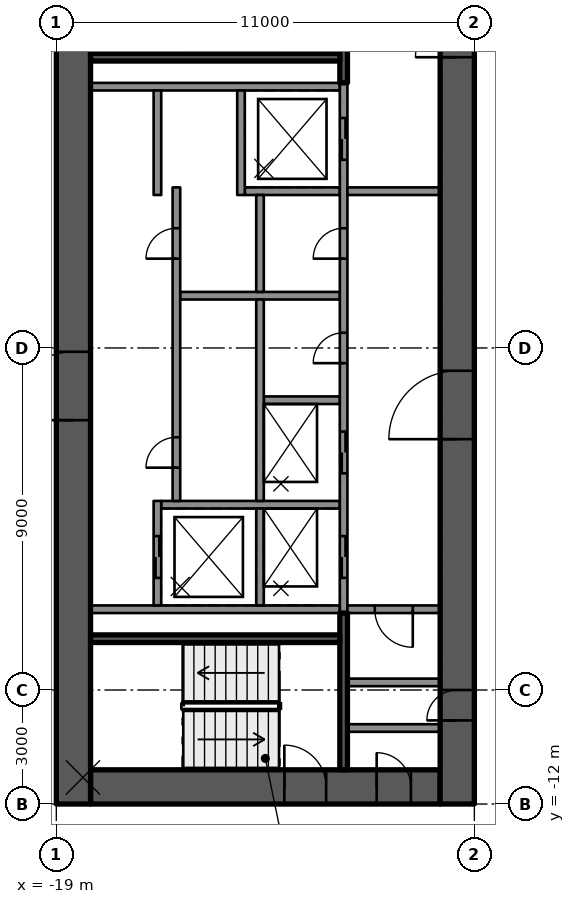
"""IFC4 building model, lengths in metres.
Left out: names, types, materials, properties, quantities, classifications, styles, units other than length and angle.
Written with IfcOpenShell. Run it as: python <this file> out.ifc"""

import sys

from ifc_helpers import new_model, si_unit, direction, frame, frame_2d, origin, place, context, subcontext, project, spatial, rectangle, extrude, element, fill, save


model = new_model("IFC4")
c1 = context("Model", 3, precision=1e-05, world=origin(), true_north=direction((0.0, 1.0)))
c2 = subcontext(c1, "Body", "Model", "MODEL_VIEW")
j1 = project(units=[si_unit("LENGTHUNIT", "METRE"), si_unit("PLANEANGLEUNIT", "RADIAN")], contexts=[c1])
p1 = place(None, origin())
s1 = spatial("IfcSite", under=j1, at=p1, CompositionType="ELEMENT")
p2 = place(p1, origin())
s2 = spatial("IfcBuilding", under=s1, at=p2, CompositionType="ELEMENT")
p3 = place(p2, frame((0.0, 0.0, 275.4)))
s3 = spatial("IfcBuildingStorey", under=s2, at=p3, CompositionType="ELEMENT", Elevation=275.4)
p4 = place(p3, frame((-18.1, -11.55, 0.0), z_axis=(0.0, 0.0, 1.0), x_axis=(1.0, 0.0, 0.0)))
e1 = element("IfcWall", 1, at=p4, inside=s3, PredefinedType="SHEAR", context=c2, shape_type="SweptSolid", body=[
    extrude(rectangle(XDim=9.2, YDim=0.9, at=frame_2d((4.6, 0.0))), origin(), (0.0, 0.0, 1.0), 3.5),
])
p5 = place(p4, frame((5.1, 0.0, 0.0)))
e2 = element("IfcOpeningElement", 2, at=p5, cuts=e1, PredefinedType="OPENING", context=c2, shape_type="SweptSolid", body=[
    extrude(rectangle(XDim=1.1, YDim=2.1, at=frame_2d((0.55, 1.05))), frame((0.0, 0.46, 0.0), z_axis=(0.0, -1.0, 0.0), x_axis=(1.0, 0.0, 0.0)), (0.0, 0.0, 1.0), 0.92),
])
p6 = place(p4, frame((7.53, 0.0, 0.0)))
e3 = element("IfcOpeningElement", 3, at=p6, cuts=e1, PredefinedType="OPENING", context=c2, shape_type="SweptSolid", body=[
    extrude(rectangle(XDim=0.9, YDim=2.1, at=frame_2d((0.45, 1.05))), frame((0.0, 0.46, 0.0), z_axis=(0.0, -1.0, 0.0), x_axis=(1.0, 0.0, 0.0)), (0.0, 0.0, 1.0), 0.92),
])
p7 = place(p3, frame((-18.55, -12.0, 0.0), z_axis=(0.0, 0.0, 1.0), x_axis=(0.0, 1.0, 0.0)))
e4 = element("IfcWall", 4, at=p7, inside=s3, PredefinedType="SHEAR", context=c2, shape_type="SweptSolid", body=[
    extrude(rectangle(XDim=24.0, YDim=0.9, at=frame_2d((12.0, 0.0))), origin(), (0.0, 0.0, 1.0), 3.5),
])
p8 = place(p7, frame((10.1, 0.0, 0.0)))
e5 = element("IfcOpeningElement", 5, at=p8, cuts=e4, PredefinedType="OPENING", context=c2, shape_type="SweptSolid", body=[
    extrude(rectangle(XDim=1.8, YDim=2.1, at=frame_2d((0.9, 1.05))), frame((0.0, 0.46, 0.0), z_axis=(0.0, -1.0, 0.0), x_axis=(1.0, 0.0, 0.0)), (0.0, 0.0, 1.0), 0.92),
])
p9 = place(p3, frame((-8.45, -12.0, 0.0), z_axis=(0.0, 0.0, 1.0), x_axis=(0.0, 1.0, 0.0)))
e6 = element("IfcWall", 6, at=p9, inside=s3, PredefinedType="SHEAR", context=c2, shape_type="SweptSolid", body=[
    extrude(rectangle(XDim=24.0, YDim=0.9, at=frame_2d((12.0, 0.0))), origin(), (0.0, 0.0, 1.0), 3.5),
])
p10 = place(p9, frame((9.6, 0.0, 0.0)))
e7 = element("IfcOpeningElement", 7, at=p10, cuts=e6, PredefinedType="OPENING", context=c2, shape_type="SweptSolid", body=[
    extrude(rectangle(XDim=1.8, YDim=2.1, at=frame_2d((0.9, 1.05))), frame((0.0, 0.46, 0.0), z_axis=(0.0, -1.0, 0.0), x_axis=(1.0, 0.0, 0.0)), (0.0, 0.0, 1.0), 0.92),
])
p11 = place(p9, frame((19.65, 0.0, 0.0)))
e8 = element("IfcOpeningElement", 8, at=p11, cuts=e6, PredefinedType="OPENING", context=c2, shape_type="SweptSolid", body=[
    extrude(rectangle(XDim=1.1, YDim=2.1, at=frame_2d((0.55, 1.05))), frame((0.0, 0.46, 0.0), z_axis=(0.0, -1.0, 0.0), x_axis=(1.0, 0.0, 0.0)), (0.0, 0.0, 1.0), 0.92),
])
p12 = place(p9, frame((2.2, 0.0, 0.0)))
e9 = element("IfcOpeningElement", 9, at=p12, cuts=e6, PredefinedType="OPENING", context=c2, shape_type="SweptSolid", body=[
    extrude(rectangle(XDim=0.8, YDim=2.1, at=frame_2d((0.4, 1.05))), frame((0.0, 0.46, 0.0), z_axis=(0.0, -1.0, 0.0), x_axis=(1.0, 0.0, 0.0)), (0.0, 0.0, 1.0), 0.92),
])
for number, where, z_axis, x_axis in (
    (10, (-11.54, 6.875, 0.0), (0.0, 0.0, 1.0), (-1.0, 0.0, 0.0)),
    (11, (-11.54, -6.875, 0.0), (0.0, 0.0, 1.0), (-1.0, 0.0, 0.0)),
):
    element("IfcWall", number, at=place(p3, frame(where, z_axis=z_axis, x_axis=x_axis)), inside=s3, PredefinedType="SOLIDWALL", context=c2, shape_type="SweptSolid", body=[
        extrude(rectangle(XDim=6.56, YDim=0.2, at=frame_2d((3.28, 0.0))), origin(), (0.0, 0.0, 1.0), 3.09),
    ])
p13 = place(p3, frame((-11.54, -4.125, 0.0), z_axis=(0.0, 0.0, 1.0), x_axis=(-1.0, 0.0, 0.0)))
e12 = element("IfcWall", 12, at=p13, inside=s3, PredefinedType="SOLIDWALL", context=c2, shape_type="SweptSolid", body=[
    extrude(rectangle(XDim=4.7, YDim=0.2, at=frame_2d((2.35, 0.0))), origin(), (0.0, 0.0, 1.0), 3.09),
])
p14 = place(p3, frame((-11.54, -1.375, 0.0), z_axis=(0.0, 0.0, 1.0), x_axis=(-1.0, 0.0, 0.0)))
e13 = element("IfcWall", 13, at=p14, inside=s3, PredefinedType="SOLIDWALL", context=c2, shape_type="SweptSolid", body=[
    extrude(rectangle(XDim=2.0, YDim=0.2, at=frame_2d((1.0, 0.0))), origin(), (0.0, 0.0, 1.0), 3.09),
])
p15 = place(p3, frame((-11.54, 1.375, 0.0), z_axis=(0.0, 0.0, 1.0), x_axis=(-1.0, 0.0, 0.0)))
e14 = element("IfcWall", 14, at=p15, inside=s3, PredefinedType="SOLIDWALL", context=c2, shape_type="SweptSolid", body=[
    extrude(rectangle(XDim=4.2, YDim=0.2, at=frame_2d((2.1, 0.0))), origin(), (0.0, 0.0, 1.0), 3.09),
])
p16 = place(p3, frame((-11.54, 4.125, 0.0), z_axis=(0.0, 0.0, 1.0), x_axis=(-1.0, 0.0, 0.0)))
e15 = element("IfcWall", 15, at=p16, inside=s3, PredefinedType="SOLIDWALL", context=c2, shape_type="SweptSolid", body=[
    extrude(rectangle(XDim=2.5, YDim=0.2, at=frame_2d((1.25, 0.0))), origin(), (0.0, 0.0, 1.0), 3.09),
])
p17 = place(p3, frame((-11.44, -6.975, 0.0), z_axis=(0.0, 0.0, 1.0), x_axis=(0.0, 1.0, 0.0)))
e16 = element("IfcWall", 16, at=p17, inside=s3, PredefinedType="SOLIDWALL", context=c2, shape_type="SweptSolid", body=[
    extrude(rectangle(XDim=13.95, YDim=0.2, at=frame_2d((6.975, 0.0))), origin(), (0.0, 0.0, 1.0), 3.09),
])
p18 = place(p17, frame((0.925, 0.0, 0.0)))
e17 = element("IfcOpeningElement", 17, at=p18, cuts=e16, PredefinedType="OPENING", context=c2, shape_type="SweptSolid", body=[
    extrude(rectangle(XDim=1.1, YDim=2.1, at=frame_2d((0.55, 1.05))), frame((0.0, 0.11, 0.0), z_axis=(0.0, -1.0, 0.0), x_axis=(1.0, 0.0, 0.0)), (0.0, 0.0, 1.0), 0.22),
])
p19 = place(p17, frame((3.675, 0.0, 0.0)))
e18 = element("IfcOpeningElement", 18, at=p19, cuts=e16, PredefinedType="OPENING", context=c2, shape_type="SweptSolid", body=[
    extrude(rectangle(XDim=1.1, YDim=2.1, at=frame_2d((0.55, 1.05))), frame((0.0, 0.11, 0.0), z_axis=(0.0, -1.0, 0.0), x_axis=(1.0, 0.0, 0.0)), (0.0, 0.0, 1.0), 0.22),
])
p20 = place(p17, frame((11.925, 0.0, 0.0)))
e19 = element("IfcOpeningElement", 19, at=p20, cuts=e16, PredefinedType="OPENING", context=c2, shape_type="SweptSolid", body=[
    extrude(rectangle(XDim=1.1, YDim=2.1, at=frame_2d((0.55, 1.05))), frame((0.0, 0.11, 0.0), z_axis=(0.0, -1.0, 0.0), x_axis=(1.0, 0.0, 0.0)), (0.0, 0.0, 1.0), 0.22),
])
p21 = place(p17, frame((6.575, 0.0, 0.0)))
e20 = element("IfcOpeningElement", 20, at=p21, cuts=e16, PredefinedType="OPENING", context=c2, shape_type="SweptSolid", body=[
    extrude(rectangle(XDim=0.8, YDim=2.1, at=frame_2d((0.4, 1.05))), frame((0.0, 0.11, 0.0), z_axis=(0.0, -1.0, 0.0), x_axis=(1.0, 0.0, 0.0)), (0.0, 0.0, 1.0), 0.22),
])
p22 = place(p17, frame((9.325, 0.0, 0.0)))
e21 = element("IfcOpeningElement", 21, at=p22, cuts=e16, PredefinedType="OPENING", context=c2, shape_type="SweptSolid", body=[
    extrude(rectangle(XDim=0.8, YDim=2.1, at=frame_2d((0.4, 1.05))), frame((0.0, 0.11, 0.0), z_axis=(0.0, -1.0, 0.0), x_axis=(1.0, 0.0, 0.0)), (0.0, 0.0, 1.0), 0.22),
])
p23 = place(p3, frame((-13.64, -6.775, 0.0), z_axis=(0.0, 0.0, 1.0), x_axis=(0.0, 1.0, 0.0)))
e22 = element("IfcWall", 22, at=p23, inside=s3, PredefinedType="SOLIDWALL", context=c2, shape_type="SweptSolid", body=[
    extrude(rectangle(XDim=2.55, YDim=0.2, at=frame_2d((1.275, 0.0))), origin(), (0.0, 0.0, 1.0), 3.09),
])
p24 = place(p3, frame((-13.64, -4.025, 0.0), z_axis=(0.0, 0.0, 1.0), x_axis=(0.0, 1.0, 0.0)))
e23 = element("IfcWall", 23, at=p24, inside=s3, PredefinedType="SOLIDWALL", context=c2, shape_type="SweptSolid", body=[
    extrude(rectangle(XDim=5.3, YDim=0.2, at=frame_2d((2.65, 0.0))), origin(), (0.0, 0.0, 1.0), 3.09),
])
p25 = place(p3, frame((-13.64, 1.475, 0.0), z_axis=(0.0, 0.0, 1.0), x_axis=(0.0, 1.0, 0.0)))
e24 = element("IfcWall", 24, at=p25, inside=s3, PredefinedType="SOLIDWALL", context=c2, shape_type="SweptSolid", body=[
    extrude(rectangle(XDim=2.55, YDim=0.2, at=frame_2d((1.275, 0.0))), origin(), (0.0, 0.0, 1.0), 3.09),
])
p26 = place(p3, frame((-14.14, 4.025, 0.0), z_axis=(0.0, 0.0, 1.0), x_axis=(0.0, 1.0, 0.0)))
e25 = element("IfcWall", 25, at=p26, inside=s3, PredefinedType="SOLIDWALL", context=c2, shape_type="SweptSolid", body=[
    extrude(rectangle(XDim=2.75, YDim=0.2, at=frame_2d((1.375, 0.0))), origin(), (0.0, 0.0, 1.0), 3.09),
])
p27 = place(p3, frame((-16.34, -6.775, 0.0), z_axis=(0.0, 0.0, 1.0), x_axis=(0.0, 1.0, 0.0)))
e26 = element("IfcWall", 26, at=p27, inside=s3, PredefinedType="SOLIDWALL", context=c2, shape_type="SweptSolid", body=[
    extrude(rectangle(XDim=2.75, YDim=0.2, at=frame_2d((1.375, 0.0))), origin(), (0.0, 0.0, 1.0), 3.09),
])
p28 = place(p27, frame((0.725, 0.0, 0.0)))
e27 = element("IfcOpeningElement", 27, at=p28, cuts=e26, PredefinedType="OPENING", context=c2, shape_type="SweptSolid", body=[
    extrude(rectangle(XDim=1.1, YDim=2.1, at=frame_2d((0.55, 1.05))), frame((0.0, 0.11, 0.0), z_axis=(0.0, -1.0, 0.0), x_axis=(1.0, 0.0, 0.0)), (0.0, 0.0, 1.0), 0.22),
])
p29 = place(p3, frame((-15.84, -4.025, 0.0), z_axis=(0.0, 0.0, 1.0), x_axis=(0.0, 1.0, 0.0)))
e28 = element("IfcWall", 28, at=p29, inside=s3, PredefinedType="SOLIDWALL", context=c2, shape_type="SweptSolid", body=[
    extrude(rectangle(XDim=8.25, YDim=0.2, at=frame_2d((4.125, 0.0))), origin(), (0.0, 0.0, 1.0), 3.09),
])
p30 = place(p29, frame((0.875, 0.0, 0.0)))
e29 = element("IfcOpeningElement", 29, at=p30, cuts=e28, PredefinedType="OPENING", context=c2, shape_type="SweptSolid", body=[
    extrude(rectangle(XDim=0.8, YDim=2.1, at=frame_2d((0.4, 1.05))), frame((0.0, 0.11, 0.0), z_axis=(0.0, -1.0, 0.0), x_axis=(1.0, 0.0, 0.0)), (0.0, 0.0, 1.0), 0.22),
])
p31 = place(p29, frame((6.375, 0.0, 0.0)))
e30 = element("IfcOpeningElement", 30, at=p31, cuts=e28, PredefinedType="OPENING", context=c2, shape_type="SweptSolid", body=[
    extrude(rectangle(XDim=0.8, YDim=2.1, at=frame_2d((0.4, 1.05))), frame((0.0, 0.11, 0.0), z_axis=(0.0, -1.0, 0.0), x_axis=(1.0, 0.0, 0.0)), (0.0, 0.0, 1.0), 0.22),
])
p32 = place(p3, frame((-16.34, 4.025, 0.0), z_axis=(0.0, 0.0, 1.0), x_axis=(0.0, 1.0, 0.0)))
e31 = element("IfcWall", 31, at=p32, inside=s3, PredefinedType="SOLIDWALL", context=c2, shape_type="SweptSolid", body=[
    extrude(rectangle(XDim=2.75, YDim=0.2, at=frame_2d((1.375, 0.0))), origin(), (0.0, 0.0, 1.0), 3.09),
])
p33 = place(p3, frame((-11.44, 6.975, 0.0), z_axis=(0.0, 0.0, 1.0), x_axis=(0.0, 1.0, 0.0)))
e32 = element("IfcWall", 32, at=p33, inside=s3, PredefinedType="SOLIDWALL", context=c2, shape_type="SweptSolid", body=[
    extrude(rectangle(XDim=4.125, YDim=0.2, at=frame_2d((2.062, 0.0))), origin(), (0.0, 0.0, 1.0), 3.09),
])
p34 = place(p33, frame((2.1, 0.0, 0.0)))
e33 = element("IfcOpeningElement", 33, at=p34, cuts=e32, PredefinedType="OPENING", context=c2, shape_type="SweptSolid", body=[
    extrude(rectangle(XDim=1.1, YDim=2.1, at=frame_2d((0.55, 1.05))), frame((0.0, 0.11, 0.0), z_axis=(0.0, -1.0, 0.0), x_axis=(1.0, 0.0, 0.0)), (0.0, 0.0, 1.0), 0.22),
])
p35 = place(p3, frame((-11.54, 7.65, 0.0), z_axis=(0.0, 0.0, 1.0), x_axis=(-1.0, 0.0, 0.0)))
e34 = element("IfcWall", 34, at=p35, inside=s3, PredefinedType="SOLIDWALL", context=c2, shape_type="SweptSolid", body=[
    extrude(rectangle(XDim=6.56, YDim=0.2, at=frame_2d((3.28, 0.0))), origin(), (0.0, 0.0, 1.0), 3.09),
])
p36 = place(p3, frame((-11.44, -11.1, 0.0), z_axis=(0.0, 0.0, 1.0), x_axis=(0.0, 1.0, 0.0)))
e35 = element("IfcWall", 35, at=p36, inside=s3, PredefinedType="SOLIDWALL", context=c2, shape_type="SweptSolid", body=[
    extrude(rectangle(XDim=4.125, YDim=0.2, at=frame_2d((2.062, 0.0))), origin(), (0.0, 0.0, 1.0), 3.09),
])
p37 = place(p3, frame((-11.54, -7.65, 0.0), z_axis=(0.0, 0.0, 1.0), x_axis=(-1.0, 0.0, 0.0)))
e36 = element("IfcWall", 36, at=p37, inside=s3, PredefinedType="SOLIDWALL", context=c2, shape_type="SweptSolid", body=[
    extrude(rectangle(XDim=6.56, YDim=0.2, at=frame_2d((3.28, 0.0))), origin(), (0.0, 0.0, 1.0), 3.09),
])
p38 = place(p3, frame((-8.9, 4.125, 0.0), z_axis=(0.0, 0.0, 1.0), x_axis=(-1.0, 0.0, 0.0)))
e37 = element("IfcWall", 37, at=p38, inside=s3, PredefinedType="PARTITIONING", context=c2, shape_type="SweptSolid", body=[
    extrude(rectangle(XDim=2.44, YDim=0.2, at=frame_2d((1.22, 0.0))), origin(), (0.0, 0.0, 1.0), 3.09),
])
p39 = place(p3, frame((-8.9, -6.875, 0.0), z_axis=(0.0, 0.0, 1.0), x_axis=(-1.0, 0.0, 0.0)))
e38 = element("IfcWall", 38, at=p39, inside=s3, PredefinedType="PARTITIONING", context=c2, shape_type="SweptSolid", body=[
    extrude(rectangle(XDim=2.44, YDim=0.2, at=frame_2d((1.22, 0.0))), origin(), (0.0, 0.0, 1.0), 3.09),
])
p40 = place(p39, frame((0.72, 0.0, 0.0)))
e39 = element("IfcOpeningElement", 39, at=p40, cuts=e38, PredefinedType="OPENING", context=c2, shape_type="SweptSolid", body=[
    extrude(rectangle(XDim=1.0, YDim=2.1, at=frame_2d((0.5, 1.05))), frame((0.0, 0.11, 0.0), z_axis=(0.0, -1.0, 0.0), x_axis=(1.0, 0.0, 0.0)), (0.0, 0.0, 1.0), 0.22),
])
for number, where, z_axis, x_axis in (
    (40, (-8.9, -10.0, 0.0), (0.0, 0.0, 1.0), (-1.0, 0.0, 0.0)),
    (41, (-8.9, -8.8, 0.0), (0.0, 0.0, 1.0), (-1.0, 0.0, 0.0)),
):
    element("IfcWall", number, at=place(p3, frame(where, z_axis=z_axis, x_axis=x_axis)), inside=s3, PredefinedType="PARTITIONING", context=c2, shape_type="SweptSolid", body=[
        extrude(rectangle(XDim=2.44, YDim=0.2, at=frame_2d((1.22, 0.0))), origin(), (0.0, 0.0, 1.0), 3.09),
    ])
p41 = place(p18, origin())
e42 = element("IfcDoor", 42, at=p41, inside=s3, OperationType="DOUBLE_DOOR_SLIDING", PredefinedType="DOOR", context=c2, shape_type="SweptSolid", body=[
    extrude(rectangle(XDim=1.1, YDim=2.1, at=frame_2d((0.55, 1.05))), frame((0.0, 0.025, 0.0), z_axis=(0.0, -1.0, 0.0), x_axis=(1.0, 0.0, 0.0)), (0.0, 0.0, 1.0), 0.05),
])
fill(e17, e42)
p42 = place(p28, origin())
e43 = element("IfcDoor", 43, at=p42, inside=s3, OperationType="DOUBLE_DOOR_SLIDING", PredefinedType="DOOR", context=c2, shape_type="SweptSolid", body=[
    extrude(rectangle(XDim=1.1, YDim=2.1, at=frame_2d((0.55, 1.05))), frame((0.0, 0.025, 0.0), z_axis=(0.0, -1.0, 0.0), x_axis=(1.0, 0.0, 0.0)), (0.0, 0.0, 1.0), 0.05),
])
fill(e27, e43)
p43 = place(p19, origin())
e44 = element("IfcDoor", 44, at=p43, inside=s3, OperationType="DOUBLE_DOOR_SLIDING", PredefinedType="DOOR", context=c2, shape_type="SweptSolid", body=[
    extrude(rectangle(XDim=1.1, YDim=2.1, at=frame_2d((0.55, 1.05))), frame((0.0, 0.025, 0.0), z_axis=(0.0, -1.0, 0.0), x_axis=(1.0, 0.0, 0.0)), (0.0, 0.0, 1.0), 0.05),
])
fill(e18, e44)
p44 = place(p20, origin())
e45 = element("IfcDoor", 45, at=p44, inside=s3, OperationType="DOUBLE_DOOR_SLIDING", PredefinedType="DOOR", context=c2, shape_type="SweptSolid", body=[
    extrude(rectangle(XDim=1.1, YDim=2.1, at=frame_2d((0.55, 1.05))), frame((0.0, 0.025, 0.0), z_axis=(0.0, -1.0, 0.0), x_axis=(1.0, 0.0, 0.0)), (0.0, 0.0, 1.0), 0.05),
])
fill(e19, e45)
p45 = place(p30, origin())
e46 = element("IfcDoor", 46, at=p45, inside=s3, OperationType="SINGLE_SWING_LEFT", PredefinedType="DOOR", context=c2, shape_type="SweptSolid", body=[
    extrude(rectangle(XDim=0.8, YDim=2.1, at=frame_2d((0.4, 1.05))), frame((0.0, 0.025, 0.0), z_axis=(0.0, -1.0, 0.0), x_axis=(1.0, 0.0, 0.0)), (0.0, 0.0, 1.0), 0.05),
])
fill(e29, e46)
p46 = place(p21, origin())
e47 = element("IfcDoor", 47, at=p46, inside=s3, OperationType="SINGLE_SWING_LEFT", PredefinedType="DOOR", context=c2, shape_type="SweptSolid", body=[
    extrude(rectangle(XDim=0.8, YDim=2.1, at=frame_2d((0.4, 1.05))), frame((0.0, 0.025, 0.0), z_axis=(0.0, -1.0, 0.0), x_axis=(1.0, 0.0, 0.0)), (0.0, 0.0, 1.0), 0.05),
])
fill(e20, e47)
p47 = place(p22, origin())
e48 = element("IfcDoor", 48, at=p47, inside=s3, OperationType="SINGLE_SWING_LEFT", PredefinedType="DOOR", context=c2, shape_type="SweptSolid", body=[
    extrude(rectangle(XDim=0.8, YDim=2.1, at=frame_2d((0.4, 1.05))), frame((0.0, 0.025, 0.0), z_axis=(0.0, -1.0, 0.0), x_axis=(1.0, 0.0, 0.0)), (0.0, 0.0, 1.0), 0.05),
])
fill(e21, e48)
p48 = place(p31, origin())
e49 = element("IfcDoor", 49, at=p48, inside=s3, OperationType="SINGLE_SWING_LEFT", PredefinedType="DOOR", context=c2, shape_type="SweptSolid", body=[
    extrude(rectangle(XDim=0.8, YDim=2.1, at=frame_2d((0.4, 1.05))), frame((0.0, 0.025, 0.0), z_axis=(0.0, -1.0, 0.0), x_axis=(1.0, 0.0, 0.0)), (0.0, 0.0, 1.0), 0.05),
])
fill(e30, e49)
p49 = place(p10, origin())
e50 = element("IfcDoor", 50, at=p49, inside=s3, OperationType="SINGLE_SWING_LEFT", PredefinedType="DOOR", context=c2, shape_type="SweptSolid", body=[
    extrude(rectangle(XDim=1.8, YDim=2.1, at=frame_2d((0.9, 1.05))), frame((0.0, 0.025, 0.0), z_axis=(0.0, -1.0, 0.0), x_axis=(1.0, 0.0, 0.0)), (0.0, 0.0, 1.0), 0.05),
])
fill(e7, e50)
p50 = place(p8, origin())
e51 = element("IfcDoor", 51, at=p50, inside=s3, OperationType="SINGLE_SWING_LEFT", PredefinedType="DOOR", context=c2, shape_type="SweptSolid", body=[
    extrude(rectangle(XDim=1.8, YDim=2.1, at=frame_2d((0.9, 1.05))), frame((0.0, 0.025, 0.0), z_axis=(0.0, -1.0, 0.0), x_axis=(1.0, 0.0, 0.0)), (0.0, 0.0, 1.0), 0.05),
])
fill(e5, e51)
p51 = place(p11, origin())
e52 = element("IfcDoor", 52, at=p51, inside=s3, OperationType="SINGLE_SWING_RIGHT", PredefinedType="DOOR", context=c2, shape_type="SweptSolid", body=[
    extrude(rectangle(XDim=1.1, YDim=2.1, at=frame_2d((0.55, 1.05))), frame((0.0, 0.025, 0.0), z_axis=(0.0, -1.0, 0.0), x_axis=(1.0, 0.0, 0.0)), (0.0, 0.0, 1.0), 0.05),
])
fill(e8, e52)
p52 = place(p5, origin())
e53 = element("IfcDoor", 53, at=p52, inside=s3, OperationType="SINGLE_SWING_RIGHT", PredefinedType="DOOR", context=c2, shape_type="SweptSolid", body=[
    extrude(rectangle(XDim=1.1, YDim=2.1, at=frame_2d((0.55, 1.05))), frame((0.0, 0.025, 0.0), z_axis=(0.0, -1.0, 0.0), x_axis=(1.0, 0.0, 0.0)), (0.0, 0.0, 1.0), 0.05),
])
fill(e2, e53)
p53 = place(p6, origin())
e54 = element("IfcDoor", 54, at=p53, inside=s3, OperationType="SINGLE_SWING_RIGHT", PredefinedType="DOOR", context=c2, shape_type="SweptSolid", body=[
    extrude(rectangle(XDim=0.9, YDim=2.1, at=frame_2d((0.45, 1.05))), frame((0.0, 0.025, 0.0), z_axis=(0.0, -1.0, 0.0), x_axis=(1.0, 0.0, 0.0)), (0.0, 0.0, 1.0), 0.05),
])
fill(e3, e54)
p54 = place(p12, origin())
e55 = element("IfcDoor", 55, at=p54, inside=s3, OperationType="SINGLE_SWING_LEFT", PredefinedType="DOOR", context=c2, shape_type="SweptSolid", body=[
    extrude(rectangle(XDim=0.8, YDim=2.1, at=frame_2d((0.4, 1.05))), frame((0.0, 0.025, 0.0), z_axis=(0.0, -1.0, 0.0), x_axis=(1.0, 0.0, 0.0)), (0.0, 0.0, 1.0), 0.05),
])
fill(e9, e55)
p55 = place(p40, origin())
e56 = element("IfcDoor", 56, at=p55, inside=s3, OperationType="SINGLE_SWING_RIGHT", PredefinedType="DOOR", context=c2, shape_type="SweptSolid", body=[
    extrude(rectangle(XDim=1.0, YDim=2.1, at=frame_2d((0.5, 1.05))), frame((0.0, 0.025, 0.0), z_axis=(0.0, -1.0, 0.0), x_axis=(1.0, 0.0, 0.0)), (0.0, 0.0, 1.0), 0.05),
])
fill(e39, e56)
save(model, sys.argv[1])
